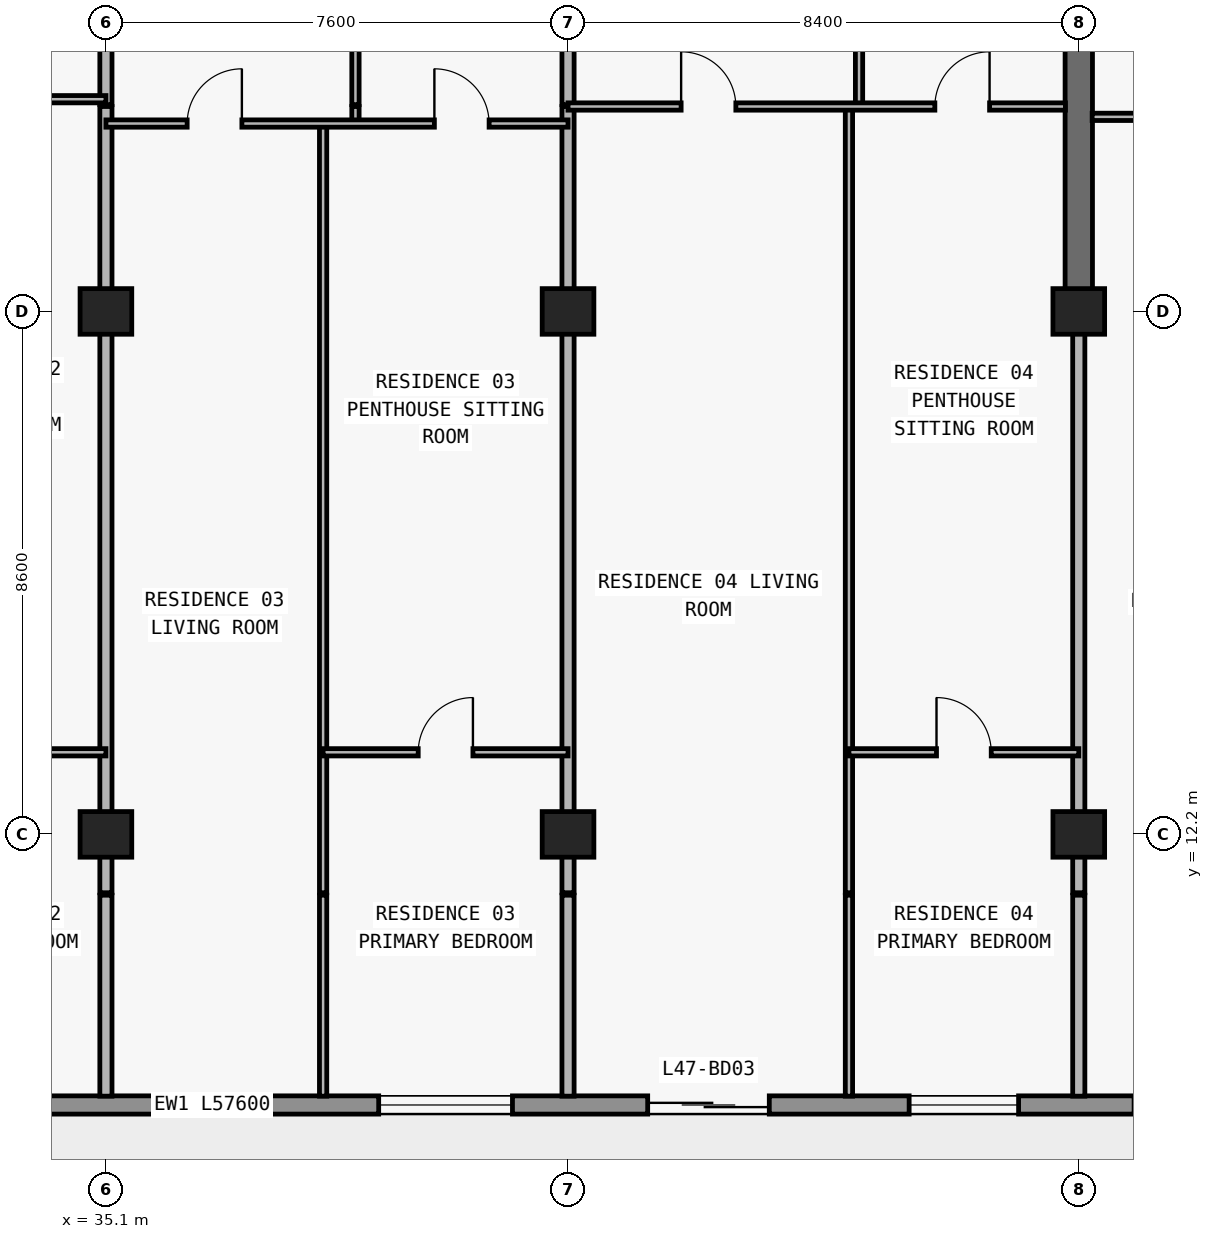
"""IFC4 building model, lengths in metres.
Left out: names, types, materials, properties, quantities, classifications, styles, units other than length and angle.
Written with IfcOpenShell. Run it as: python <this file> out.ifc"""

import sys

from ifc_helpers import new_model, si_unit, direction, frame, frame_2d, origin, origin_2d, place, context, subcontext, project, spatial, rectangle, extrude, element, fill, save


model = new_model("IFC4")
c1 = context("Model", 3, precision=1e-05, world=origin(), true_north=direction((0.0, 1.0)))
c2 = subcontext(c1, "Body", "Model", "MODEL_VIEW")
j1 = project(units=[si_unit("LENGTHUNIT", "METRE"), si_unit("PLANEANGLEUNIT", "RADIAN")], contexts=[c1])
p1 = place(None, origin())
s1 = spatial("IfcSite", under=j1, at=p1, CompositionType="ELEMENT")
p2 = place(p1, origin())
s2 = spatial("IfcBuilding", under=s1, at=p2, CompositionType="ELEMENT")
p3 = place(p2, frame((0.0, 0.0, 170.4)))
s3 = spatial("IfcBuildingStorey", under=s2, at=p3, CompositionType="ELEMENT", Elevation=170.4)
for number, where, z_axis, x_axis in (
    (1, (35.1, 12.2, 0.0), (0.0, 0.0, 1.0), (1.0, 0.0, 0.0)),
    (2, (42.7, 12.2, 0.0), (0.0, 0.0, 1.0), (1.0, 0.0, 0.0)),
    (3, (51.1, 12.2, 0.0), (0.0, 0.0, 1.0), (1.0, 0.0, 0.0)),
    (4, (35.1, 20.8, 0.0), (0.0, 0.0, 1.0), (1.0, 0.0, 0.0)),
    (5, (42.7, 20.8, 0.0), (0.0, 0.0, 1.0), (1.0, 0.0, 0.0)),
    (6, (51.1, 20.8, 0.0), (0.0, 0.0, 1.0), (1.0, 0.0, 0.0)),
):
    element("IfcColumn", number, at=place(p3, frame(where, z_axis=z_axis, x_axis=x_axis)), inside=s3, PredefinedType="COLUMN", context=c2, shape_type="SweptSolid", body=[
        extrude(rectangle(XDim=0.85, YDim=0.75, at=origin_2d()), origin(), (0.0, 0.0, 1.0), 3.05),
    ])
p4 = place(p3, frame((51.1, 20.8, 0.0), z_axis=(0.0, 0.0, 1.0), x_axis=(0.0, 1.0, 0.0)))
e7 = element("IfcWall", 7, at=p4, inside=s3, PredefinedType="SHEAR", context=c2, shape_type="SweptSolid", body=[
    extrude(rectangle(XDim=8.6, YDim=0.45, at=frame_2d((4.3, 0.0))), origin(), (0.0, 0.0, 1.0), 3.05),
])
p5 = place(p3, frame((67.7, 7.75, 0.0), z_axis=(0.0, 0.0, 1.0), x_axis=(-1.0, 0.0, 0.0)))
e8 = element("IfcWall", 8, at=p5, inside=s3, PredefinedType="STANDARD", context=c2, shape_type="SweptSolid", body=[
    extrude(rectangle(XDim=57.6, YDim=0.3, at=frame_2d((28.8, 0.0))), origin(), (0.0, 0.0, 1.0), 3.05),
])
p6 = place(p5, frame((54.69, 0.0, 0.0)))
e9 = element("IfcOpeningElement", 9, at=p6, cuts=e8, PredefinedType="OPENING", context=c2, shape_type="SweptSolid", body=[
    extrude(rectangle(XDim=2.0, YDim=2.3, at=frame_2d((1.0, 1.15))), frame((0.0, 0.16, 0.0), z_axis=(0.0, -1.0, 0.0), x_axis=(1.0, 0.0, 0.0)), (0.0, 0.0, 1.0), 0.32),
])
p7 = place(p5, frame((50.21, 0.0, 0.65)))
e10 = element("IfcOpeningElement", 10, at=p7, cuts=e8, PredefinedType="OPENING", context=c2, shape_type="SweptSolid", body=[
    extrude(rectangle(XDim=2.6, YDim=1.85, at=frame_2d((1.3, 0.925))), frame((0.0, 0.16, 0.0), z_axis=(0.0, -1.0, 0.0), x_axis=(1.0, 0.0, 0.0)), (0.0, 0.0, 1.0), 0.32),
])
p8 = place(p5, frame((44.1, 0.0, 0.85)))
e11 = element("IfcOpeningElement", 11, at=p8, cuts=e8, PredefinedType="OPENING", context=c2, shape_type="SweptSolid", body=[
    extrude(rectangle(XDim=2.2, YDim=1.55, at=frame_2d((1.1, 0.775))), frame((0.0, 0.16, 0.0), z_axis=(0.0, -1.0, 0.0), x_axis=(1.0, 0.0, 0.0)), (0.0, 0.0, 1.0), 0.32),
])
p9 = place(p5, frame((37.69, 0.0, 0.0)))
e12 = element("IfcOpeningElement", 12, at=p9, cuts=e8, PredefinedType="OPENING", context=c2, shape_type="SweptSolid", body=[
    extrude(rectangle(XDim=2.0, YDim=2.3, at=frame_2d((1.0, 1.15))), frame((0.0, 0.16, 0.0), z_axis=(0.0, -1.0, 0.0), x_axis=(1.0, 0.0, 0.0)), (0.0, 0.0, 1.0), 0.32),
])
p10 = place(p5, frame((33.59, 0.0, 0.85)))
e13 = element("IfcOpeningElement", 13, at=p10, cuts=e8, PredefinedType="OPENING", context=c2, shape_type="SweptSolid", body=[
    extrude(rectangle(XDim=1.8, YDim=1.55, at=frame_2d((0.9, 0.775))), frame((0.0, 0.16, 0.0), z_axis=(0.0, -1.0, 0.0), x_axis=(1.0, 0.0, 0.0)), (0.0, 0.0, 1.0), 0.32),
])
p11 = place(p5, frame((25.914, 0.0, 0.85)))
e14 = element("IfcOpeningElement", 14, at=p11, cuts=e8, PredefinedType="OPENING", context=c2, shape_type="SweptSolid", body=[
    extrude(rectangle(XDim=2.2, YDim=1.55, at=frame_2d((1.1, 0.775))), frame((0.0, 0.16, 0.0), z_axis=(0.0, -1.0, 0.0), x_axis=(1.0, 0.0, 0.0)), (0.0, 0.0, 1.0), 0.32),
])
p12 = place(p5, frame((21.69, 0.0, 0.0)))
e15 = element("IfcOpeningElement", 15, at=p12, cuts=e8, PredefinedType="OPENING", context=c2, shape_type="SweptSolid", body=[
    extrude(rectangle(XDim=2.0, YDim=2.3, at=frame_2d((1.0, 1.15))), frame((0.0, 0.16, 0.0), z_axis=(0.0, -1.0, 0.0), x_axis=(1.0, 0.0, 0.0)), (0.0, 0.0, 1.0), 0.32),
])
p13 = place(p5, frame((17.59, 0.0, 0.85)))
e16 = element("IfcOpeningElement", 16, at=p13, cuts=e8, PredefinedType="OPENING", context=c2, shape_type="SweptSolid", body=[
    extrude(rectangle(XDim=1.8, YDim=1.55, at=frame_2d((0.9, 0.775))), frame((0.0, 0.16, 0.0), z_axis=(0.0, -1.0, 0.0), x_axis=(1.0, 0.0, 0.0)), (0.0, 0.0, 1.0), 0.32),
])
p14 = place(p5, frame((13.69, 0.0, 0.0)))
e17 = element("IfcOpeningElement", 17, at=p14, cuts=e8, PredefinedType="OPENING", context=c2, shape_type="SweptSolid", body=[
    extrude(rectangle(XDim=2.0, YDim=2.3, at=frame_2d((1.0, 1.15))), frame((0.0, 0.16, 0.0), z_axis=(0.0, -1.0, 0.0), x_axis=(1.0, 0.0, 0.0)), (0.0, 0.0, 1.0), 0.32),
])
p15 = place(p5, frame((9.01, 0.0, 0.65)))
e18 = element("IfcOpeningElement", 18, at=p15, cuts=e8, PredefinedType="OPENING", context=c2, shape_type="SweptSolid", body=[
    extrude(rectangle(XDim=2.6, YDim=1.85, at=frame_2d((1.3, 0.925))), frame((0.0, 0.16, 0.0), z_axis=(0.0, -1.0, 0.0), x_axis=(1.0, 0.0, 0.0)), (0.0, 0.0, 1.0), 0.32),
])
p16 = place(p5, frame((3.0, 0.0, 0.85)))
e19 = element("IfcOpeningElement", 19, at=p16, cuts=e8, PredefinedType="OPENING", context=c2, shape_type="SweptSolid", body=[
    extrude(rectangle(XDim=2.2, YDim=1.55, at=frame_2d((1.1, 0.775))), frame((0.0, 0.16, 0.0), z_axis=(0.0, -1.0, 0.0), x_axis=(1.0, 0.0, 0.0)), (0.0, 0.0, 1.0), 0.32),
])
p17 = place(p3, frame((35.1, 7.895, 0.0), z_axis=(0.0, 0.0, 1.0), x_axis=(0.0, 1.0, 0.0)))
e20 = element("IfcWall", 20, at=p17, inside=s3, PredefinedType="PARTITIONING", context=c2, shape_type="SweptSolid", body=[
    extrude(rectangle(XDim=3.305, YDim=0.2, at=frame_2d((1.652, 0.0))), origin(), (0.0, 0.0, 1.0), 3.05),
])
p18 = place(p3, frame((35.1, 11.24, 0.0), z_axis=(0.0, 0.0, 1.0), x_axis=(0.0, 1.0, 0.0)))
e21 = element("IfcWall", 21, at=p18, inside=s3, PredefinedType="PARTITIONING", context=c2, shape_type="SweptSolid", body=[
    extrude(rectangle(XDim=12.93, YDim=0.2, at=frame_2d((6.465, 0.0))), origin(), (0.0, 0.0, 1.0), 2.263),
])
p19 = place(p3, frame((35.1, 24.2, 0.0), z_axis=(0.0, 0.0, 1.0), x_axis=(0.0, 1.0, 0.0)))
e22 = element("IfcWall", 22, at=p19, inside=s3, PredefinedType="PARTITIONING", context=c2, shape_type="SweptSolid", body=[
    extrude(rectangle(XDim=4.84, YDim=0.2, at=frame_2d((2.42, 0.0))), origin(), (0.0, 0.0, 1.0), 2.263),
])
p20 = place(p3, frame((38.672, 7.895, 0.0), z_axis=(0.0, 0.0, 1.0), x_axis=(0.0, 1.0, 0.0)))
e23 = element("IfcWall", 23, at=p20, inside=s3, PredefinedType="PARTITIONING", context=c2, shape_type="SweptSolid", body=[
    extrude(rectangle(XDim=3.305, YDim=0.12, at=frame_2d((1.652, 0.0))), origin(), (0.0, 0.0, 1.0), 3.05),
])
p21 = place(p3, frame((38.672, 11.24, 0.0), z_axis=(0.0, 0.0, 1.0), x_axis=(0.0, 1.0, 0.0)))
e24 = element("IfcWall", 24, at=p21, inside=s3, PredefinedType="PARTITIONING", context=c2, shape_type="SweptSolid", body=[
    extrude(rectangle(XDim=12.65, YDim=0.12, at=frame_2d((6.325, 0.0))), origin(), (0.0, 0.0, 1.0), 3.05),
])
p22 = place(p3, frame((39.204, 23.89, 0.0), z_axis=(0.0, 0.0, 1.0), x_axis=(0.0, 1.0, 0.0)))
e25 = element("IfcWall", 25, at=p22, inside=s3, PredefinedType="PARTITIONING", context=c2, shape_type="SweptSolid", body=[
    extrude(rectangle(XDim=0.28, YDim=0.12, at=frame_2d((0.14, 0.0))), origin(), (0.0, 0.0, 1.0), 3.05),
])
p23 = place(p3, frame((39.204, 24.2, 0.0), z_axis=(0.0, 0.0, 1.0), x_axis=(0.0, 1.0, 0.0)))
e26 = element("IfcWall", 26, at=p23, inside=s3, PredefinedType="PARTITIONING", context=c2, shape_type="SweptSolid", body=[
    extrude(rectangle(XDim=4.84, YDim=0.12, at=frame_2d((2.42, 0.0))), origin(), (0.0, 0.0, 1.0), 3.05),
])
p24 = place(p23, frame((1.97, 0.0, 0.0)))
e27 = element("IfcOpeningElement", 27, at=p24, cuts=e26, PredefinedType="OPENING", context=c2, shape_type="SweptSolid", body=[
    extrude(rectangle(XDim=0.9, YDim=2.15, at=frame_2d((0.45, 1.075))), frame((0.0, 0.07, 0.0), z_axis=(0.0, -1.0, 0.0), x_axis=(1.0, 0.0, 0.0)), (0.0, 0.0, 1.0), 0.14),
])
p25 = place(p3, frame((42.7, 7.895, 0.0), z_axis=(0.0, 0.0, 1.0), x_axis=(0.0, 1.0, 0.0)))
e28 = element("IfcWall", 28, at=p25, inside=s3, PredefinedType="PARTITIONING", context=c2, shape_type="SweptSolid", body=[
    extrude(rectangle(XDim=3.305, YDim=0.2, at=frame_2d((1.652, 0.0))), origin(), (0.0, 0.0, 1.0), 3.05),
])
p26 = place(p3, frame((42.7, 11.24, 0.0), z_axis=(0.0, 0.0, 1.0), x_axis=(0.0, 1.0, 0.0)))
e29 = element("IfcWall", 29, at=p26, inside=s3, PredefinedType="PARTITIONING", context=c2, shape_type="SweptSolid", body=[
    extrude(rectangle(XDim=12.93, YDim=0.2, at=frame_2d((6.465, 0.0))), origin(), (0.0, 0.0, 1.0), 2.263),
])
p27 = place(p3, frame((42.7, 24.2, 0.0), z_axis=(0.0, 0.0, 1.0), x_axis=(0.0, 1.0, 0.0)))
e30 = element("IfcWall", 30, at=p27, inside=s3, PredefinedType="PARTITIONING", context=c2, shape_type="SweptSolid", body=[
    extrude(rectangle(XDim=4.84, YDim=0.2, at=frame_2d((2.42, 0.0))), origin(), (0.0, 0.0, 1.0), 2.263),
])
p28 = place(p3, frame((47.32, 7.895, 0.0), z_axis=(0.0, 0.0, 1.0), x_axis=(0.0, 1.0, 0.0)))
e31 = element("IfcWall", 31, at=p28, inside=s3, PredefinedType="PARTITIONING", context=c2, shape_type="SweptSolid", body=[
    extrude(rectangle(XDim=3.305, YDim=0.12, at=frame_2d((1.652, 0.0))), origin(), (0.0, 0.0, 1.0), 3.05),
])
p29 = place(p3, frame((47.32, 11.24, 0.0), z_axis=(0.0, 0.0, 1.0), x_axis=(0.0, 1.0, 0.0)))
e32 = element("IfcWall", 32, at=p29, inside=s3, PredefinedType="PARTITIONING", context=c2, shape_type="SweptSolid", body=[
    extrude(rectangle(XDim=12.93, YDim=0.12, at=frame_2d((6.465, 0.0))), origin(), (0.0, 0.0, 1.0), 3.05),
])
p30 = place(p3, frame((47.486, 24.2, 0.0), z_axis=(0.0, 0.0, 1.0), x_axis=(0.0, 1.0, 0.0)))
e33 = element("IfcWall", 33, at=p30, inside=s3, PredefinedType="PARTITIONING", context=c2, shape_type="SweptSolid", body=[
    extrude(rectangle(XDim=4.84, YDim=0.12, at=frame_2d((2.42, 0.0))), origin(), (0.0, 0.0, 1.0), 3.05),
])
p31 = place(p30, frame((1.97, 0.0, 0.0)))
e34 = element("IfcOpeningElement", 34, at=p31, cuts=e33, PredefinedType="OPENING", context=c2, shape_type="SweptSolid", body=[
    extrude(rectangle(XDim=0.9, YDim=2.15, at=frame_2d((0.45, 1.075))), frame((0.0, 0.07, 0.0), z_axis=(0.0, -1.0, 0.0), x_axis=(1.0, 0.0, 0.0)), (0.0, 0.0, 1.0), 0.14),
])
p32 = place(p3, frame((51.1, 7.895, 0.0), z_axis=(0.0, 0.0, 1.0), x_axis=(0.0, 1.0, 0.0)))
e35 = element("IfcWall", 35, at=p32, inside=s3, PredefinedType="PARTITIONING", context=c2, shape_type="SweptSolid", body=[
    extrude(rectangle(XDim=3.305, YDim=0.2, at=frame_2d((1.652, 0.0))), origin(), (0.0, 0.0, 1.0), 3.05),
])
p33 = place(p3, frame((51.1, 11.24, 0.0), z_axis=(0.0, 0.0, 1.0), x_axis=(0.0, 1.0, 0.0)))
e36 = element("IfcWall", 36, at=p33, inside=s3, PredefinedType="PARTITIONING", context=c2, shape_type="SweptSolid", body=[
    extrude(rectangle(XDim=9.555, YDim=0.2, at=frame_2d((4.777, 0.0))), origin(), (0.0, 0.0, 1.0), 2.263),
])
p34 = place(p3, frame((31.4, 13.55, 0.0), z_axis=(0.0, 0.0, 1.0), x_axis=(1.0, 0.0, 0.0)))
e37 = element("IfcWall", 37, at=p34, inside=s3, PredefinedType="PARTITIONING", context=c2, shape_type="SweptSolid", body=[
    extrude(rectangle(XDim=3.7, YDim=0.12, at=frame_2d((1.85, 0.0))), origin(), (0.0, 0.0, 1.0), 3.05),
])
p35 = place(p34, frame((1.4, 0.0, 0.0)))
e38 = element("IfcOpeningElement", 38, at=p35, cuts=e37, PredefinedType="OPENING", context=c2, shape_type="SweptSolid", body=[
    extrude(rectangle(XDim=0.9, YDim=2.15, at=frame_2d((0.45, 1.075))), frame((0.0, 0.07, 0.0), z_axis=(0.0, -1.0, 0.0), x_axis=(1.0, 0.0, 0.0)), (0.0, 0.0, 1.0), 0.14),
])
p36 = place(p3, frame((38.672, 13.55, 0.0), z_axis=(0.0, 0.0, 1.0), x_axis=(1.0, 0.0, 0.0)))
e39 = element("IfcWall", 39, at=p36, inside=s3, PredefinedType="PARTITIONING", context=c2, shape_type="SweptSolid", body=[
    extrude(rectangle(XDim=4.028, YDim=0.12, at=frame_2d((2.014, 0.0))), origin(), (0.0, 0.0, 1.0), 3.05),
])
p37 = place(p36, frame((1.564, 0.0, 0.0)))
e40 = element("IfcOpeningElement", 40, at=p37, cuts=e39, PredefinedType="OPENING", context=c2, shape_type="SweptSolid", body=[
    extrude(rectangle(XDim=0.9, YDim=2.15, at=frame_2d((0.45, 1.075))), frame((0.0, 0.07, 0.0), z_axis=(0.0, -1.0, 0.0), x_axis=(1.0, 0.0, 0.0)), (0.0, 0.0, 1.0), 0.14),
])
p38 = place(p3, frame((47.32, 13.55, 0.0), z_axis=(0.0, 0.0, 1.0), x_axis=(1.0, 0.0, 0.0)))
e41 = element("IfcWall", 41, at=p38, inside=s3, PredefinedType="PARTITIONING", context=c2, shape_type="SweptSolid", body=[
    extrude(rectangle(XDim=3.78, YDim=0.12, at=frame_2d((1.89, 0.0))), origin(), (0.0, 0.0, 1.0), 3.05),
])
p39 = place(p38, frame((1.44, 0.0, 0.0)))
e42 = element("IfcOpeningElement", 42, at=p39, cuts=e41, PredefinedType="OPENING", context=c2, shape_type="SweptSolid", body=[
    extrude(rectangle(XDim=0.9, YDim=2.15, at=frame_2d((0.45, 1.075))), frame((0.0, 0.07, 0.0), z_axis=(0.0, -1.0, 0.0), x_axis=(1.0, 0.0, 0.0)), (0.0, 0.0, 1.0), 0.14),
])
p40 = place(p3, frame((35.1, 23.89, 0.0), z_axis=(0.0, 0.0, 1.0), x_axis=(1.0, 0.0, 0.0)))
e43 = element("IfcWall", 43, at=p40, inside=s3, PredefinedType="PARTITIONING", context=c2, shape_type="SweptSolid", body=[
    extrude(rectangle(XDim=7.6, YDim=0.12, at=frame_2d((3.8, 0.0))), origin(), (0.0, 0.0, 1.0), 3.05),
])
p41 = place(p40, frame((1.336, 0.0, 0.0)))
e44 = element("IfcOpeningElement", 44, at=p41, cuts=e43, PredefinedType="OPENING", context=c2, shape_type="SweptSolid", body=[
    extrude(rectangle(XDim=0.9, YDim=2.15, at=frame_2d((0.45, 1.075))), frame((0.0, 0.07, 0.0), z_axis=(0.0, -1.0, 0.0), x_axis=(1.0, 0.0, 0.0)), (0.0, 0.0, 1.0), 0.14),
])
p42 = place(p40, frame((5.402, 0.0, 0.0)))
e45 = element("IfcOpeningElement", 45, at=p42, cuts=e43, PredefinedType="OPENING", context=c2, shape_type="SweptSolid", body=[
    extrude(rectangle(XDim=0.9, YDim=2.15, at=frame_2d((0.45, 1.075))), frame((0.0, 0.07, 0.0), z_axis=(0.0, -1.0, 0.0), x_axis=(1.0, 0.0, 0.0)), (0.0, 0.0, 1.0), 0.14),
])
p43 = place(p3, frame((51.32, 24.0, 0.0), z_axis=(0.0, 0.0, 1.0), x_axis=(1.0, 0.0, 0.0)))
e46 = element("IfcWall", 46, at=p43, inside=s3, PredefinedType="PARTITIONING", context=c2, shape_type="SweptSolid", body=[
    extrude(rectangle(XDim=8.18, YDim=0.12, at=frame_2d((4.09, 0.0))), origin(), (0.0, 0.0, 1.0), 3.05),
])
p44 = place(p43, frame((1.33, 0.0, 0.0)))
e47 = element("IfcOpeningElement", 47, at=p44, cuts=e46, PredefinedType="OPENING", context=c2, shape_type="SweptSolid", body=[
    extrude(rectangle(XDim=0.9, YDim=2.15, at=frame_2d((0.45, 1.075))), frame((0.0, 0.07, 0.0), z_axis=(0.0, -1.0, 0.0), x_axis=(1.0, 0.0, 0.0)), (0.0, 0.0, 1.0), 0.14),
])
p45 = place(p3, frame((42.7, 24.17, 0.0), z_axis=(0.0, 0.0, 1.0), x_axis=(1.0, 0.0, 0.0)))
e48 = element("IfcWall", 48, at=p45, inside=s3, PredefinedType="PARTITIONING", context=c2, shape_type="SweptSolid", body=[
    extrude(rectangle(XDim=8.18, YDim=0.12, at=frame_2d((4.09, 0.0))), origin(), (0.0, 0.0, 1.0), 3.05),
])
p46 = place(p45, frame((1.86, 0.0, 0.0)))
e49 = element("IfcOpeningElement", 49, at=p46, cuts=e48, PredefinedType="OPENING", context=c2, shape_type="SweptSolid", body=[
    extrude(rectangle(XDim=0.9, YDim=2.15, at=frame_2d((0.45, 1.075))), frame((0.0, 0.07, 0.0), z_axis=(0.0, -1.0, 0.0), x_axis=(1.0, 0.0, 0.0)), (0.0, 0.0, 1.0), 0.14),
])
p47 = place(p45, frame((6.033, 0.0, 0.0)))
e50 = element("IfcOpeningElement", 50, at=p47, cuts=e48, PredefinedType="OPENING", context=c2, shape_type="SweptSolid", body=[
    extrude(rectangle(XDim=0.9, YDim=2.15, at=frame_2d((0.45, 1.075))), frame((0.0, 0.07, 0.0), z_axis=(0.0, -1.0, 0.0), x_axis=(1.0, 0.0, 0.0)), (0.0, 0.0, 1.0), 0.14),
])
p48 = place(p3, frame((31.4, 24.29, 0.0), z_axis=(0.0, 0.0, 1.0), x_axis=(1.0, 0.0, 0.0)))
e51 = element("IfcWall", 51, at=p48, inside=s3, PredefinedType="PARTITIONING", context=c2, shape_type="SweptSolid", body=[
    extrude(rectangle(XDim=3.7, YDim=0.12, at=frame_2d((1.85, 0.0))), origin(), (0.0, 0.0, 1.0), 3.05),
])
p49 = place(p48, frame((1.4, 0.0, 0.0)))
e52 = element("IfcOpeningElement", 52, at=p49, cuts=e51, PredefinedType="OPENING", context=c2, shape_type="SweptSolid", body=[
    extrude(rectangle(XDim=0.9, YDim=2.15, at=frame_2d((0.45, 1.075))), frame((0.0, 0.07, 0.0), z_axis=(0.0, -1.0, 0.0), x_axis=(1.0, 0.0, 0.0)), (0.0, 0.0, 1.0), 0.14),
])
p50 = place(p11, origin())
e53 = element("IfcWindow", 53, at=p50, inside=s3, PartitioningType="SINGLE_PANEL", PredefinedType="WINDOW", context=c2, shape_type="SweptSolid", body=[
    extrude(rectangle(XDim=2.2, YDim=1.55, at=frame_2d((1.1, 0.775))), frame((0.0, 0.03, 0.0), z_axis=(0.0, -1.0, 0.0), x_axis=(1.0, 0.0, 0.0)), (0.0, 0.0, 1.0), 0.06),
])
fill(e14, e53)
p51 = place(p12, origin())
e54 = element("IfcDoor", 54, at=p51, inside=s3, OperationType="DOUBLE_DOOR_SLIDING", PredefinedType="DOOR", context=c2, shape_type="SweptSolid", body=[
    extrude(rectangle(XDim=2.0, YDim=2.3, at=frame_2d((1.0, 1.15))), frame((0.0, 0.025, 0.0), z_axis=(0.0, -1.0, 0.0), x_axis=(1.0, 0.0, 0.0)), (0.0, 0.0, 1.0), 0.05),
])
fill(e15, e54)
p52 = place(p13, origin())
e55 = element("IfcWindow", 55, at=p52, inside=s3, PartitioningType="SINGLE_PANEL", PredefinedType="WINDOW", context=c2, shape_type="SweptSolid", body=[
    extrude(rectangle(XDim=1.8, YDim=1.55, at=frame_2d((0.9, 0.775))), frame((0.0, 0.03, 0.0), z_axis=(0.0, -1.0, 0.0), x_axis=(1.0, 0.0, 0.0)), (0.0, 0.0, 1.0), 0.06),
])
fill(e16, e55)
p53 = place(p41, origin())
e56 = element("IfcDoor", 56, at=p53, inside=s3, OperationType="SINGLE_SWING_RIGHT", PredefinedType="DOOR", context=c2, shape_type="SweptSolid", body=[
    extrude(rectangle(XDim=0.9, YDim=2.15, at=frame_2d((0.45, 1.075))), frame((0.0, 0.025, 0.0), z_axis=(0.0, -1.0, 0.0), x_axis=(1.0, 0.0, 0.0)), (0.0, 0.0, 1.0), 0.05),
])
fill(e44, e56)
p54 = place(p42, origin())
e57 = element("IfcDoor", 57, at=p54, inside=s3, OperationType="SINGLE_SWING_LEFT", PredefinedType="DOOR", context=c2, shape_type="SweptSolid", body=[
    extrude(rectangle(XDim=0.9, YDim=2.15, at=frame_2d((0.45, 1.075))), frame((0.0, 0.025, 0.0), z_axis=(0.0, -1.0, 0.0), x_axis=(1.0, 0.0, 0.0)), (0.0, 0.0, 1.0), 0.05),
])
fill(e45, e57)
p55 = place(p37, origin())
e58 = element("IfcDoor", 58, at=p55, inside=s3, OperationType="SINGLE_SWING_RIGHT", PredefinedType="DOOR", context=c2, shape_type="SweptSolid", body=[
    extrude(rectangle(XDim=0.9, YDim=2.15, at=frame_2d((0.45, 1.075))), frame((0.0, 0.025, 0.0), z_axis=(0.0, -1.0, 0.0), x_axis=(1.0, 0.0, 0.0)), (0.0, 0.0, 1.0), 0.05),
])
fill(e40, e58)
p56 = place(p46, origin())
e59 = element("IfcDoor", 59, at=p56, inside=s3, OperationType="SINGLE_SWING_LEFT", PredefinedType="DOOR", context=c2, shape_type="SweptSolid", body=[
    extrude(rectangle(XDim=0.9, YDim=2.15, at=frame_2d((0.45, 1.075))), frame((0.0, 0.025, 0.0), z_axis=(0.0, -1.0, 0.0), x_axis=(1.0, 0.0, 0.0)), (0.0, 0.0, 1.0), 0.05),
])
fill(e49, e59)
p57 = place(p47, origin())
e60 = element("IfcDoor", 60, at=p57, inside=s3, OperationType="SINGLE_SWING_RIGHT", PredefinedType="DOOR", context=c2, shape_type="SweptSolid", body=[
    extrude(rectangle(XDim=0.9, YDim=2.15, at=frame_2d((0.45, 1.075))), frame((0.0, 0.025, 0.0), z_axis=(0.0, -1.0, 0.0), x_axis=(1.0, 0.0, 0.0)), (0.0, 0.0, 1.0), 0.05),
])
fill(e50, e60)
p58 = place(p39, origin())
e61 = element("IfcDoor", 61, at=p58, inside=s3, OperationType="SINGLE_SWING_LEFT", PredefinedType="DOOR", context=c2, shape_type="SweptSolid", body=[
    extrude(rectangle(XDim=0.9, YDim=2.15, at=frame_2d((0.45, 1.075))), frame((0.0, 0.025, 0.0), z_axis=(0.0, -1.0, 0.0), x_axis=(1.0, 0.0, 0.0)), (0.0, 0.0, 1.0), 0.05),
])
fill(e42, e61)
save(model, sys.argv[1])
